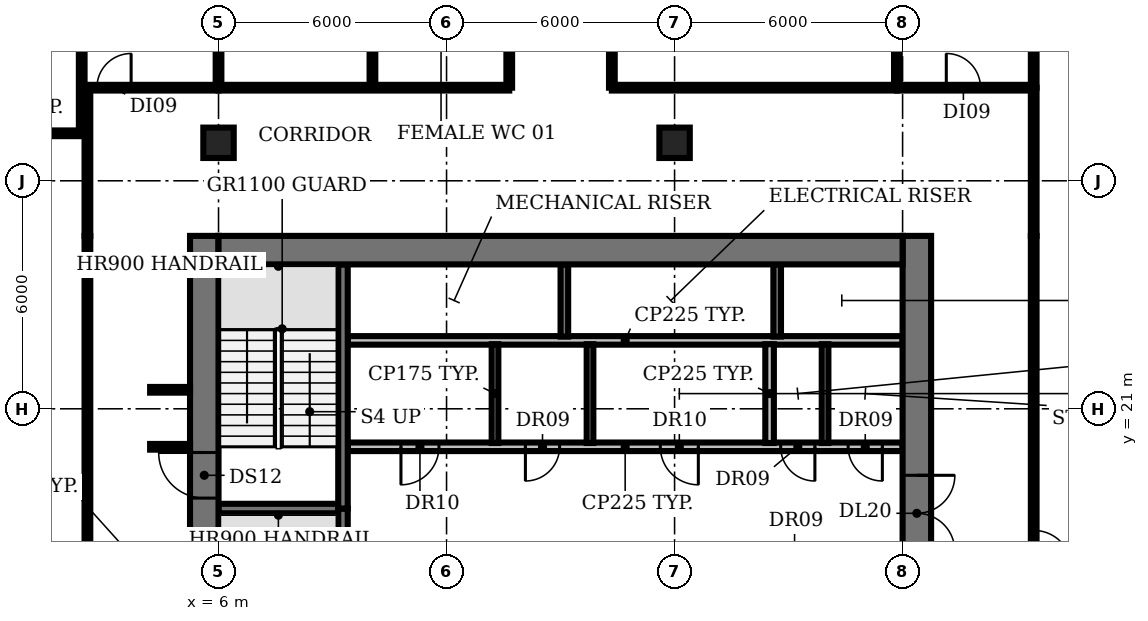
"""IFC4 building model, lengths in metres.
Left out: names, types, materials, properties, quantities, classifications, styles, units other than length and angle.
Written with IfcOpenShell. Run it as: python <this file> out.ifc"""

import sys

from ifc_helpers import new_model, si_unit, direction, frame, frame_2d, origin, origin_2d, place, context, subcontext, project, spatial, rectangle, extrude, element, fill, save


model = new_model("IFC4")
c1 = context("Model", 3, precision=1e-05, world=origin(), true_north=direction((0.0, 1.0)))
c2 = subcontext(c1, "Body", "Model", "MODEL_VIEW")
j1 = project(units=[si_unit("LENGTHUNIT", "METRE"), si_unit("PLANEANGLEUNIT", "RADIAN")], contexts=[c1])
p1 = place(None, origin())
s1 = spatial("IfcSite", under=j1, at=p1, CompositionType="ELEMENT")
p2 = place(p1, origin())
s2 = spatial("IfcBuilding", under=s1, at=p2, CompositionType="ELEMENT")
p3 = place(p2, frame((0.0, 0.0, 117.2)))
s3 = spatial("IfcBuildingStorey", under=s2, at=p3, CompositionType="ELEMENT", Elevation=117.2)
for number, where, z_axis, x_axis in (
    (1, (6.0, 28.0, 0.0), (0.0, 0.0, 1.0), (1.0, 0.0, 0.0)),
    (2, (18.0, 28.0, 0.0), (0.0, 0.0, 1.0), (1.0, 0.0, 0.0)),
):
    element("IfcColumn", number, at=place(p3, frame(where, z_axis=z_axis, x_axis=x_axis)), inside=s3, PredefinedType="COLUMN", context=c2, shape_type="SweptSolid", body=[
        extrude(rectangle(XDim=0.8, YDim=0.8, at=origin_2d()), origin(), (0.0, 0.0, 1.0), 3.85),
    ])
p4 = place(p3, frame((6.0, 18.375, 0.0), z_axis=(0.0, 0.0, 1.0), x_axis=(1.0, 0.0, 0.0)))
e3 = element("IfcWall", 3, at=p4, inside=s3, PredefinedType="SHEAR", context=c2, shape_type="SweptSolid", body=[
    extrude(rectangle(XDim=3.15, YDim=0.25, at=frame_2d((1.575, 0.0))), origin(), (0.0, 0.0, 1.0), 3.85),
])
p5 = place(p3, frame((24.0, 20.0, 0.0), z_axis=(0.0, 0.0, 1.0), x_axis=(-1.0, 0.0, 0.0)))
e4 = element("IfcWall", 4, at=p5, inside=s3, PredefinedType="PARTITIONING", context=c2, shape_type="SweptSolid", body=[
    extrude(rectangle(XDim=14.6, YDim=0.225, at=frame_2d((7.3, 0.0))), origin(), (0.0, 0.0, 1.0), 3.85),
])
p6 = place(p5, frame((12.2, 0.0, 0.0)))
e5 = element("IfcOpeningElement", 5, at=p6, cuts=e4, PredefinedType="OPENING", context=c2, shape_type="SweptSolid", body=[
    extrude(rectangle(XDim=1.0, YDim=2.1, at=frame_2d((0.5, 1.05))), frame((0.0, 0.123, 0.0), z_axis=(0.0, -1.0, 0.0), x_axis=(1.0, 0.0, 0.0)), (0.0, 0.0, 1.0), 0.245),
])
p7 = place(p5, frame((9.025, 0.0, 0.0)))
e6 = element("IfcOpeningElement", 6, at=p7, cuts=e4, PredefinedType="OPENING", context=c2, shape_type="SweptSolid", body=[
    extrude(rectangle(XDim=0.9, YDim=2.1, at=frame_2d((0.45, 1.05))), frame((0.0, 0.123, 0.0), z_axis=(0.0, -1.0, 0.0), x_axis=(1.0, 0.0, 0.0)), (0.0, 0.0, 1.0), 0.245),
])
p8 = place(p5, frame((5.375, 0.0, 0.0)))
e7 = element("IfcOpeningElement", 7, at=p8, cuts=e4, PredefinedType="OPENING", context=c2, shape_type="SweptSolid", body=[
    extrude(rectangle(XDim=1.0, YDim=2.1, at=frame_2d((0.5, 1.05))), frame((0.0, 0.123, 0.0), z_axis=(0.0, -1.0, 0.0), x_axis=(1.0, 0.0, 0.0)), (0.0, 0.0, 1.0), 0.245),
])
p9 = place(p5, frame((2.308, 0.0, 0.0)))
e8 = element("IfcOpeningElement", 8, at=p9, cuts=e4, PredefinedType="OPENING", context=c2, shape_type="SweptSolid", body=[
    extrude(rectangle(XDim=0.9, YDim=2.1, at=frame_2d((0.45, 1.05))), frame((0.0, 0.123, 0.0), z_axis=(0.0, -1.0, 0.0), x_axis=(1.0, 0.0, 0.0)), (0.0, 0.0, 1.0), 0.245),
])
p10 = place(p5, frame((0.532, 0.0, 0.0)))
e9 = element("IfcOpeningElement", 9, at=p10, cuts=e4, PredefinedType="OPENING", context=c2, shape_type="SweptSolid", body=[
    extrude(rectangle(XDim=0.9, YDim=2.1, at=frame_2d((0.45, 1.05))), frame((0.0, 0.123, 0.0), z_axis=(0.0, -1.0, 0.0), x_axis=(1.0, 0.0, 0.0)), (0.0, 0.0, 1.0), 0.245),
])
p11 = place(p3, frame((9.4, 22.8, 0.0), z_axis=(0.0, 0.0, 1.0), x_axis=(1.0, 0.0, 0.0)))
e10 = element("IfcWall", 10, at=p11, inside=s3, PredefinedType="PARTITIONING", context=c2, shape_type="SweptSolid", body=[
    extrude(rectangle(XDim=14.6, YDim=0.225, at=frame_2d((7.3, 0.0))), origin(), (0.0, 0.0, 1.0), 3.85),
])
p12 = place(p3, frame((9.275, 18.375, 0.0), z_axis=(0.0, 0.0, 1.0), x_axis=(0.0, -1.0, 0.0)))
e11 = element("IfcWall", 11, at=p12, inside=s3, PredefinedType="SHEAR", context=c2, shape_type="SweptSolid", body=[
    extrude(rectangle(XDim=6.55, YDim=0.25, at=frame_2d((3.275, 0.0))), origin(), (0.0, 0.0, 1.0), 3.85),
])
p13 = place(p12, frame((5.075, 0.0, 0.0)))
e12 = element("IfcOpeningElement", 12, at=p13, cuts=e11, PredefinedType="OPENING", context=c2, shape_type="SweptSolid", body=[
    extrude(rectangle(XDim=1.0, YDim=2.1, at=frame_2d((0.5, 1.05))), frame((0.0, 0.135, 0.0), z_axis=(0.0, -1.0, 0.0), x_axis=(1.0, 0.0, 0.0)), (0.0, 0.0, 1.0), 0.27),
])
p14 = place(p3, frame((9.275, 18.375, 0.0), z_axis=(0.0, 0.0, 1.0), x_axis=(0.0, 1.0, 0.0)))
e13 = element("IfcWall", 13, at=p14, inside=s3, PredefinedType="SHEAR", context=c2, shape_type="SweptSolid", body=[
    extrude(rectangle(XDim=6.425, YDim=0.25, at=frame_2d((3.212, 0.0))), origin(), (0.0, 0.0, 1.0), 3.85),
])
p15 = place(p3, frame((13.275, 20.1, 0.0), z_axis=(0.0, 0.0, 1.0), x_axis=(0.0, 1.0, 0.0)))
e14 = element("IfcWall", 14, at=p15, inside=s3, PredefinedType="PARTITIONING", context=c2, shape_type="SweptSolid", body=[
    extrude(rectangle(XDim=2.6, YDim=0.175, at=frame_2d((1.3, 0.0))), origin(), (0.0, 0.0, 1.0), 3.85),
])
p16 = place(p3, frame((15.1, 22.9, 0.0), z_axis=(0.0, 0.0, 1.0), x_axis=(0.0, 1.0, 0.0)))
e15 = element("IfcWall", 15, at=p16, inside=s3, PredefinedType="SHEAR", context=c2, shape_type="SweptSolid", body=[
    extrude(rectangle(XDim=1.9, YDim=0.2, at=frame_2d((0.95, 0.0))), origin(), (0.0, 0.0, 1.0), 3.85),
])
p17 = place(p3, frame((15.775, 20.1, 0.0), z_axis=(0.0, 0.0, 1.0), x_axis=(0.0, 1.0, 0.0)))
e16 = element("IfcWall", 16, at=p17, inside=s3, PredefinedType="PARTITIONING", context=c2, shape_type="SweptSolid", body=[
    extrude(rectangle(XDim=2.6, YDim=0.175, at=frame_2d((1.3, 0.0))), origin(), (0.0, 0.0, 1.0), 3.85),
])
p18 = place(p3, frame((20.5, 20.1, 0.0), z_axis=(0.0, 0.0, 1.0), x_axis=(0.0, 1.0, 0.0)))
e17 = element("IfcWall", 17, at=p18, inside=s3, PredefinedType="PARTITIONING", context=c2, shape_type="SweptSolid", body=[
    extrude(rectangle(XDim=2.6, YDim=0.225, at=frame_2d((1.3, 0.0))), origin(), (0.0, 0.0, 1.0), 3.85),
])
p19 = place(p3, frame((20.7, 22.9, 0.0), z_axis=(0.0, 0.0, 1.0), x_axis=(0.0, 1.0, 0.0)))
e18 = element("IfcWall", 18, at=p19, inside=s3, PredefinedType="SHEAR", context=c2, shape_type="SweptSolid", body=[
    extrude(rectangle(XDim=1.9, YDim=0.2, at=frame_2d((0.95, 0.0))), origin(), (0.0, 0.0, 1.0), 3.85),
])
p20 = place(p3, frame((21.96, 20.1, 0.0), z_axis=(0.0, 0.0, 1.0), x_axis=(0.0, 1.0, 0.0)))
e19 = element("IfcWall", 19, at=p20, inside=s3, PredefinedType="PARTITIONING", context=c2, shape_type="SweptSolid", body=[
    extrude(rectangle(XDim=2.6, YDim=0.175, at=frame_2d((1.3, 0.0))), origin(), (0.0, 0.0, 1.0), 3.85),
])
p21 = place(p3, frame((5.625, 4.47, 0.0), z_axis=(0.0, 0.0, 1.0), x_axis=(0.0, 1.0, 0.0)))
e20 = element("IfcWall", 20, at=p21, inside=s3, PredefinedType="SHEAR", context=c2, shape_type="SweptSolid", body=[
    extrude(rectangle(XDim=21.08, YDim=0.75, at=frame_2d((10.54, 0.0))), origin(), (0.0, 0.0, 1.0), 3.85),
])
p22 = place(p21, frame((1.18, 0.0, 0.0)))
e21 = element("IfcOpeningElement", 21, at=p22, cuts=e20, PredefinedType="OPENING", context=c2, shape_type="SweptSolid", body=[
    extrude(rectangle(XDim=1.5, YDim=2.1, at=frame_2d((0.75, 1.05))), frame((0.0, 0.385, 0.0), z_axis=(0.0, -1.0, 0.0), x_axis=(1.0, 0.0, 0.0)), (0.0, 0.0, 1.0), 0.77),
])
p23 = place(p21, frame((7.63, 0.0, 0.0)))
e22 = element("IfcOpeningElement", 22, at=p23, cuts=e20, PredefinedType="OPENING", context=c2, shape_type="SweptSolid", body=[
    extrude(rectangle(XDim=1.2, YDim=2.1, at=frame_2d((0.6, 1.05))), frame((0.0, 0.385, 0.0), z_axis=(0.0, -1.0, 0.0), x_axis=(1.0, 0.0, 0.0)), (0.0, 0.0, 1.0), 0.77),
])
p24 = place(p21, frame((14.18, 0.0, 0.0)))
e23 = element("IfcOpeningElement", 23, at=p24, cuts=e20, PredefinedType="OPENING", context=c2, shape_type="SweptSolid", body=[
    extrude(rectangle(XDim=1.2, YDim=2.1, at=frame_2d((0.6, 1.05))), frame((0.0, 0.385, 0.0), z_axis=(0.0, -1.0, 0.0), x_axis=(1.0, 0.0, 0.0)), (0.0, 0.0, 1.0), 0.77),
])
p25 = place(p3, frame((24.375, 25.55, 0.0), z_axis=(0.0, 0.0, 1.0), x_axis=(0.0, -1.0, 0.0)))
e24 = element("IfcWall", 24, at=p25, inside=s3, PredefinedType="SHEAR", context=c2, shape_type="SweptSolid", body=[
    extrude(rectangle(XDim=21.13, YDim=0.75, at=frame_2d((10.565, 0.0))), origin(), (0.0, 0.0, 1.0), 3.85),
])
p26 = place(p25, frame((18.4, 0.0, 0.0)))
e25 = element("IfcOpeningElement", 25, at=p26, cuts=e24, PredefinedType="OPENING", context=c2, shape_type="SweptSolid", body=[
    extrude(rectangle(XDim=1.5, YDim=2.1, at=frame_2d((0.75, 1.05))), frame((0.0, 0.385, 0.0), z_axis=(0.0, -1.0, 0.0), x_axis=(1.0, 0.0, 0.0)), (0.0, 0.0, 1.0), 0.77),
])
p27 = place(p25, frame((12.3, 0.0, 0.0)))
e26 = element("IfcOpeningElement", 26, at=p27, cuts=e24, PredefinedType="OPENING", context=c2, shape_type="SweptSolid", body=[
    extrude(rectangle(XDim=0.9, YDim=2.1, at=frame_2d((0.45, 1.05))), frame((0.0, 0.385, 0.0), z_axis=(0.0, -1.0, 0.0), x_axis=(1.0, 0.0, 0.0)), (0.0, 0.0, 1.0), 0.77),
])
p28 = place(p25, frame((6.3, 0.0, 0.0)))
e27 = element("IfcOpeningElement", 27, at=p28, cuts=e24, PredefinedType="OPENING", context=c2, shape_type="SweptSolid", body=[
    extrude(rectangle(XDim=2.0, YDim=2.1, at=frame_2d((1.0, 1.05))), frame((0.0, 0.385, 0.0), z_axis=(0.0, -1.0, 0.0), x_axis=(1.0, 0.0, 0.0)), (0.0, 0.0, 1.0), 0.77),
])
p29 = place(p3, frame((6.0, 25.175, 0.0), z_axis=(0.0, 0.0, 1.0), x_axis=(1.0, 0.0, 0.0)))
e28 = element("IfcWall", 28, at=p29, inside=s3, PredefinedType="SHEAR", context=c2, shape_type="SweptSolid", body=[
    extrude(rectangle(XDim=18.0, YDim=0.75, at=frame_2d((9.0, 0.0))), origin(), (0.0, 0.0, 1.0), 3.85),
])
p30 = place(p3, frame((-1.12, 28.25, 0.0), z_axis=(0.0, 0.0, 1.0), x_axis=(1.0, 0.0, 0.0)))
e29 = element("IfcWall", 29, at=p30, inside=s3, PredefinedType="PARTITIONING", context=c2, shape_type="SweptSolid", body=[
    extrude(rectangle(XDim=3.52, YDim=0.15, at=frame_2d((1.76, 0.0))), origin(), (0.0, 0.0, 1.0), 2.83),
])
p31 = place(p3, frame((2.4, 28.25, 0.0), z_axis=(0.0, 0.0, 1.0), x_axis=(0.0, 1.0, 0.0)))
e30 = element("IfcWall", 30, at=p31, inside=s3, PredefinedType="PARTITIONING", context=c2, shape_type="SweptSolid", body=[
    extrude(rectangle(XDim=6.0, YDim=0.15, at=frame_2d((3.0, 0.0))), origin(), (0.0, 0.0, 1.0), 2.83),
])
p32 = place(p3, frame((2.55, 5.86, 0.0), z_axis=(0.0, 0.0, 1.0), x_axis=(0.0, 1.0, 0.0)))
e31 = element("IfcWall", 31, at=p32, inside=s3, PredefinedType="PARTITIONING", context=c2, shape_type="SweptSolid", body=[
    extrude(rectangle(XDim=19.69, YDim=0.15, at=frame_2d((9.845, 0.0))), origin(), (0.0, 0.0, 1.0), 2.83),
])
p33 = place(p32, frame((7.79, 0.0, 0.0)))
e32 = element("IfcOpeningElement", 32, at=p33, cuts=e31, PredefinedType="OPENING", context=c2, shape_type="SweptSolid", body=[
    extrude(rectangle(XDim=1.2, YDim=2.1, at=frame_2d((0.6, 1.05))), frame((0.0, 0.085, 0.0), z_axis=(0.0, -1.0, 0.0), x_axis=(1.0, 0.0, 0.0)), (0.0, 0.0, 1.0), 0.17),
])
p34 = place(p3, frame((2.55, 25.55, 0.0), z_axis=(0.0, 0.0, 1.0), x_axis=(0.0, 1.0, 0.0)))
e33 = element("IfcWall", 33, at=p34, inside=s3, PredefinedType="PARTITIONING", context=c2, shape_type="SweptSolid", body=[
    extrude(rectangle(XDim=3.9, YDim=0.15, at=frame_2d((1.95, 0.0))), origin(), (0.0, 0.0, 1.0), 2.83),
])
p35 = place(p3, frame((2.55, 29.45, 0.0), z_axis=(0.0, 0.0, 1.0), x_axis=(1.0, 0.0, 0.0)))
e34 = element("IfcWall", 34, at=p35, inside=s3, PredefinedType="PARTITIONING", context=c2, shape_type="SweptSolid", body=[
    extrude(rectangle(XDim=3.45, YDim=0.15, at=frame_2d((1.725, 0.0))), origin(), (0.0, 0.0, 1.0), 2.83),
])
p36 = place(p35, frame((0.25, 0.0, 0.0)))
e35 = element("IfcOpeningElement", 35, at=p36, cuts=e34, PredefinedType="OPENING", context=c2, shape_type="SweptSolid", body=[
    extrude(rectangle(XDim=0.9, YDim=2.1, at=frame_2d((0.45, 1.05))), frame((0.0, 0.085, 0.0), z_axis=(0.0, -1.0, 0.0), x_axis=(1.0, 0.0, 0.0)), (0.0, 0.0, 1.0), 0.17),
])
for number, where, z_axis, x_axis in (
    (36, (4.2, 20.0, 0.0), (0.0, 0.0, 1.0), (1.0, 0.0, 0.0)),
    (37, (4.2, 21.5, 0.0), (0.0, 0.0, 1.0), (1.0, 0.0, 0.0)),
):
    element("IfcWall", number, at=place(p3, frame(where, z_axis=z_axis, x_axis=x_axis)), inside=s3, PredefinedType="PARTITIONING", context=c2, shape_type="SweptSolid", body=[
        extrude(rectangle(XDim=1.05, YDim=0.15, at=frame_2d((0.525, 0.0))), origin(), (0.0, 0.0, 1.0), 2.83),
    ])
p37 = place(p3, frame((6.0, 29.45, 0.0), z_axis=(0.0, 0.0, 1.0), x_axis=(0.0, 1.0, 0.0)))
e38 = element("IfcWall", 38, at=p37, inside=s3, PredefinedType="PARTITIONING", context=c2, shape_type="SweptSolid", body=[
    extrude(rectangle(XDim=4.8, YDim=0.15, at=frame_2d((2.4, 0.0))), origin(), (0.0, 0.0, 1.0), 2.83),
])
p38 = place(p3, frame((6.0, 29.45, 0.0), z_axis=(0.0, 0.0, 1.0), x_axis=(1.0, 0.0, 0.0)))
e39 = element("IfcWall", 39, at=p38, inside=s3, PredefinedType="PARTITIONING", context=c2, shape_type="SweptSolid", body=[
    extrude(rectangle(XDim=7.65, YDim=0.15, at=frame_2d((3.825, 0.0))), origin(), (0.0, 0.0, 1.0), 2.83),
])
p39 = place(p3, frame((10.05, 29.45, 0.0), z_axis=(0.0, 0.0, 1.0), x_axis=(0.0, 1.0, 0.0)))
e40 = element("IfcWall", 40, at=p39, inside=s3, PredefinedType="PARTITIONING", context=c2, shape_type="SweptSolid", body=[
    extrude(rectangle(XDim=4.8, YDim=0.15, at=frame_2d((2.4, 0.0))), origin(), (0.0, 0.0, 1.0), 2.83),
])
p40 = place(p3, frame((13.65, 29.45, 0.0), z_axis=(0.0, 0.0, 1.0), x_axis=(0.0, 1.0, 0.0)))
e41 = element("IfcWall", 41, at=p40, inside=s3, PredefinedType="PARTITIONING", context=c2, shape_type="SweptSolid", body=[
    extrude(rectangle(XDim=4.8, YDim=0.15, at=frame_2d((2.4, 0.0))), origin(), (0.0, 0.0, 1.0), 2.83),
])
p41 = place(p40, frame((1.9, 0.0, 0.0)))
e42 = element("IfcOpeningElement", 42, at=p41, cuts=e41, PredefinedType="OPENING", context=c2, shape_type="SweptSolid", body=[
    extrude(rectangle(XDim=0.9, YDim=2.1, at=frame_2d((0.45, 1.05))), frame((0.0, 0.085, 0.0), z_axis=(0.0, -1.0, 0.0), x_axis=(1.0, 0.0, 0.0)), (0.0, 0.0, 1.0), 0.17),
])
p42 = place(p3, frame((16.35, 29.45, 0.0), z_axis=(0.0, 0.0, 1.0), x_axis=(0.0, 1.0, 0.0)))
e43 = element("IfcWall", 43, at=p42, inside=s3, PredefinedType="PARTITIONING", context=c2, shape_type="SweptSolid", body=[
    extrude(rectangle(XDim=4.8, YDim=0.15, at=frame_2d((2.4, 0.0))), origin(), (0.0, 0.0, 1.0), 2.83),
])
p43 = place(p3, frame((16.35, 29.45, 0.0), z_axis=(0.0, 0.0, 1.0), x_axis=(1.0, 0.0, 0.0)))
e44 = element("IfcWall", 44, at=p43, inside=s3, PredefinedType="PARTITIONING", context=c2, shape_type="SweptSolid", body=[
    extrude(rectangle(XDim=7.5, YDim=0.15, at=frame_2d((3.75, 0.0))), origin(), (0.0, 0.0, 1.0), 2.83),
])
p44 = place(p3, frame((23.85, 29.45, 0.0), z_axis=(0.0, 0.0, 1.0), x_axis=(0.0, 1.0, 0.0)))
e45 = element("IfcWall", 45, at=p44, inside=s3, PredefinedType="PARTITIONING", context=c2, shape_type="SweptSolid", body=[
    extrude(rectangle(XDim=4.8, YDim=0.15, at=frame_2d((2.4, 0.0))), origin(), (0.0, 0.0, 1.0), 2.83),
])
p45 = place(p3, frame((23.85, 29.45, 0.0), z_axis=(0.0, 0.0, 1.0), x_axis=(1.0, 0.0, 0.0)))
e46 = element("IfcWall", 46, at=p45, inside=s3, PredefinedType="PARTITIONING", context=c2, shape_type="SweptSolid", body=[
    extrude(rectangle(XDim=3.6, YDim=0.15, at=frame_2d((1.8, 0.0))), origin(), (0.0, 0.0, 1.0), 2.83),
])
p46 = place(p45, frame((1.3, 0.0, 0.0)))
e47 = element("IfcOpeningElement", 47, at=p46, cuts=e46, PredefinedType="OPENING", context=c2, shape_type="SweptSolid", body=[
    extrude(rectangle(XDim=0.9, YDim=2.1, at=frame_2d((0.45, 1.05))), frame((0.0, 0.085, 0.0), z_axis=(0.0, -1.0, 0.0), x_axis=(1.0, 0.0, 0.0)), (0.0, 0.0, 1.0), 0.17),
])
p47 = place(p3, frame((27.45, 25.55, 0.0), z_axis=(0.0, 0.0, 1.0), x_axis=(0.0, -1.0, 0.0)))
e48 = element("IfcWall", 48, at=p47, inside=s3, PredefinedType="PARTITIONING", context=c2, shape_type="SweptSolid", body=[
    extrude(rectangle(XDim=16.45, YDim=0.15, at=frame_2d((8.225, 0.0))), origin(), (0.0, 0.0, 1.0), 2.83),
])
p48 = place(p47, frame((7.75, 0.0, 0.0)))
e49 = element("IfcOpeningElement", 49, at=p48, cuts=e48, PredefinedType="OPENING", context=c2, shape_type="SweptSolid", body=[
    extrude(rectangle(XDim=1.0, YDim=2.1, at=frame_2d((0.5, 1.05))), frame((0.0, 0.085, 0.0), z_axis=(0.0, -1.0, 0.0), x_axis=(1.0, 0.0, 0.0)), (0.0, 0.0, 1.0), 0.17),
])
p49 = place(p3, frame((27.45, 25.55, 0.0), z_axis=(0.0, 0.0, 1.0), x_axis=(0.0, 1.0, 0.0)))
e50 = element("IfcWall", 50, at=p49, inside=s3, PredefinedType="PARTITIONING", context=c2, shape_type="SweptSolid", body=[
    extrude(rectangle(XDim=3.9, YDim=0.15, at=frame_2d((1.95, 0.0))), origin(), (0.0, 0.0, 1.0), 2.83),
])
p50 = place(p3, frame((27.45, 29.45, 0.0), z_axis=(0.0, 0.0, 1.0), x_axis=(0.0, 1.0, 0.0)))
e51 = element("IfcWall", 51, at=p50, inside=s3, PredefinedType="PARTITIONING", context=c2, shape_type="SweptSolid", body=[
    extrude(rectangle(XDim=2.49, YDim=0.15, at=frame_2d((1.245, 0.0))), origin(), (0.0, 0.0, 1.0), 2.83),
])
p51 = place(p6, origin())
e52 = element("IfcDoor", 52, at=p51, inside=s3, OperationType="SINGLE_SWING_RIGHT", PredefinedType="DOOR", context=c2, shape_type="SweptSolid", body=[
    extrude(rectangle(XDim=1.0, YDim=2.1, at=frame_2d((0.5, 1.05))), frame((0.0, 0.025, 0.0), z_axis=(0.0, -1.0, 0.0), x_axis=(1.0, 0.0, 0.0)), (0.0, 0.0, 1.0), 0.05),
])
fill(e5, e52)
p52 = place(p7, origin())
e53 = element("IfcDoor", 53, at=p52, inside=s3, OperationType="SINGLE_SWING_RIGHT", PredefinedType="DOOR", context=c2, shape_type="SweptSolid", body=[
    extrude(rectangle(XDim=0.9, YDim=2.1, at=frame_2d((0.45, 1.05))), frame((0.0, 0.025, 0.0), z_axis=(0.0, -1.0, 0.0), x_axis=(1.0, 0.0, 0.0)), (0.0, 0.0, 1.0), 0.05),
])
fill(e6, e53)
p53 = place(p8, origin())
e54 = element("IfcDoor", 54, at=p53, inside=s3, OperationType="SINGLE_SWING_LEFT", PredefinedType="DOOR", context=c2, shape_type="SweptSolid", body=[
    extrude(rectangle(XDim=1.0, YDim=2.1, at=frame_2d((0.5, 1.05))), frame((0.0, 0.025, 0.0), z_axis=(0.0, -1.0, 0.0), x_axis=(1.0, 0.0, 0.0)), (0.0, 0.0, 1.0), 0.05),
])
fill(e7, e54)
p54 = place(p9, origin())
e55 = element("IfcDoor", 55, at=p54, inside=s3, OperationType="SINGLE_SWING_LEFT", PredefinedType="DOOR", context=c2, shape_type="SweptSolid", body=[
    extrude(rectangle(XDim=0.9, YDim=2.1, at=frame_2d((0.45, 1.05))), frame((0.0, 0.025, 0.0), z_axis=(0.0, -1.0, 0.0), x_axis=(1.0, 0.0, 0.0)), (0.0, 0.0, 1.0), 0.05),
])
fill(e8, e55)
p55 = place(p10, origin())
e56 = element("IfcDoor", 56, at=p55, inside=s3, OperationType="SINGLE_SWING_LEFT", PredefinedType="DOOR", context=c2, shape_type="SweptSolid", body=[
    extrude(rectangle(XDim=0.9, YDim=2.1, at=frame_2d((0.45, 1.05))), frame((0.0, 0.025, 0.0), z_axis=(0.0, -1.0, 0.0), x_axis=(1.0, 0.0, 0.0)), (0.0, 0.0, 1.0), 0.05),
])
fill(e9, e56)
p56 = place(p24, origin())
e57 = element("IfcDoor", 57, at=p56, inside=s3, OperationType="SINGLE_SWING_RIGHT", PredefinedType="DOOR", context=c2, shape_type="SweptSolid", body=[
    extrude(rectangle(XDim=1.2, YDim=2.1, at=frame_2d((0.6, 1.05))), frame((0.0, 0.025, 0.0), z_axis=(0.0, -1.0, 0.0), x_axis=(1.0, 0.0, 0.0)), (0.0, 0.0, 1.0), 0.05),
])
fill(e23, e57)
p57 = place(p28, origin())
e58 = element("IfcDoor", 58, at=p57, inside=s3, OperationType="DOUBLE_DOOR_SINGLE_SWING", PredefinedType="DOOR", context=c2, shape_type="SweptSolid", body=[
    extrude(rectangle(XDim=2.0, YDim=2.1, at=frame_2d((1.0, 1.05))), frame((0.0, 0.025, 0.0), z_axis=(0.0, -1.0, 0.0), x_axis=(1.0, 0.0, 0.0)), (0.0, 0.0, 1.0), 0.05),
])
fill(e27, e58)
p58 = place(p36, origin())
e59 = element("IfcDoor", 59, at=p58, inside=s3, OperationType="SINGLE_SWING_RIGHT", PredefinedType="DOOR", context=c2, shape_type="SweptSolid", body=[
    extrude(rectangle(XDim=0.9, YDim=2.1, at=frame_2d((0.45, 1.05))), frame((0.0, 0.025, 0.0), z_axis=(0.0, -1.0, 0.0), x_axis=(1.0, 0.0, 0.0)), (0.0, 0.0, 1.0), 0.05),
])
fill(e35, e59)
p59 = place(p46, origin())
e60 = element("IfcDoor", 60, at=p59, inside=s3, OperationType="SINGLE_SWING_LEFT", PredefinedType="DOOR", context=c2, shape_type="SweptSolid", body=[
    extrude(rectangle(XDim=0.9, YDim=2.1, at=frame_2d((0.45, 1.05))), frame((0.0, 0.025, 0.0), z_axis=(0.0, -1.0, 0.0), x_axis=(1.0, 0.0, 0.0)), (0.0, 0.0, 1.0), 0.05),
])
fill(e47, e60)
p60 = place(p48, origin())
e61 = element("IfcDoor", 61, at=p60, inside=s3, OperationType="SINGLE_SWING_RIGHT", PredefinedType="DOOR", context=c2, shape_type="SweptSolid", body=[
    extrude(rectangle(XDim=1.0, YDim=2.1, at=frame_2d((0.5, 1.05))), frame((0.0, 0.025, 0.0), z_axis=(0.0, -1.0, 0.0), x_axis=(1.0, 0.0, 0.0)), (0.0, 0.0, 1.0), 0.05),
])
fill(e49, e61)
save(model, sys.argv[1])
